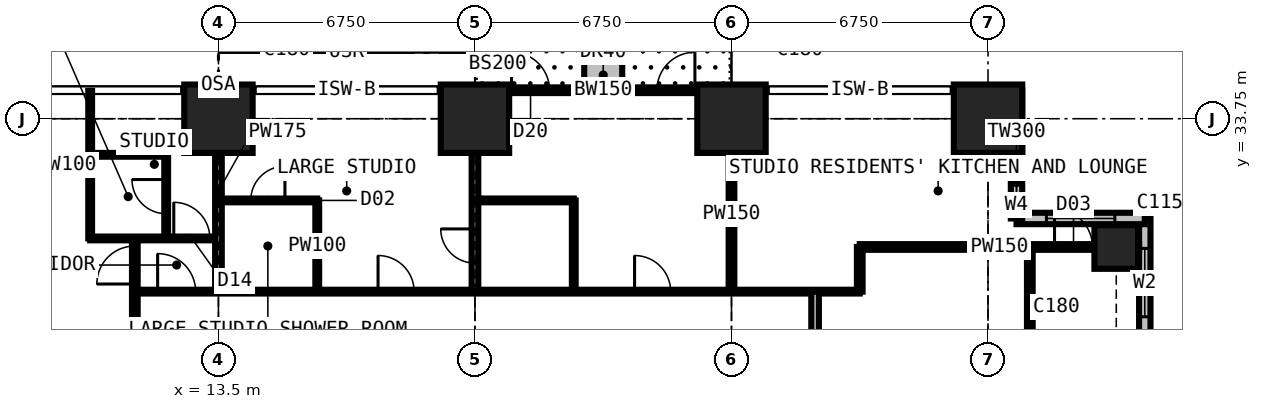
"""IFC4 building model, lengths in metres.
Left out: names, types, materials, properties, quantities, classifications, styles, units other than length and angle.
Written with IfcOpenShell. Run it as: python <this file> out.ifc"""

import sys

from ifc_helpers import new_model, si_unit, direction, frame, frame_2d, origin, origin_2d, place, context, subcontext, project, spatial, rectangle, extrude, element, fill, save


model = new_model("IFC4")
c1 = context("Model", 3, precision=1e-05, world=origin(), true_north=direction((0.0, 1.0)))
c2 = subcontext(c1, "Body", "Model", "MODEL_VIEW")
j1 = project(units=[si_unit("LENGTHUNIT", "METRE"), si_unit("PLANEANGLEUNIT", "RADIAN")], contexts=[c1])
p1 = place(None, origin())
s1 = spatial("IfcSite", under=j1, at=p1, CompositionType="ELEMENT")
p2 = place(p1, origin())
s2 = spatial("IfcBuilding", under=s1, at=p2, CompositionType="ELEMENT")
p3 = place(p2, frame((0.0, 0.0, 98.1)))
s3 = spatial("IfcBuildingStorey", under=s2, at=p3, CompositionType="ELEMENT", Elevation=98.1)
for number, where, z_axis, x_axis in (
    (1, (13.5, 33.75, 0.0), (0.0, 0.0, 1.0), (1.0, 0.0, 0.0)),
    (2, (20.25, 33.75, 0.0), (0.0, 0.0, 1.0), (1.0, 0.0, 0.0)),
    (3, (27.0, 33.75, 0.0), (0.0, 0.0, 1.0), (1.0, 0.0, 0.0)),
    (4, (33.75, 33.75, 0.0), (0.0, 0.0, 1.0), (1.0, 0.0, 0.0)),
):
    element("IfcColumn", number, at=place(p3, frame(where, z_axis=z_axis, x_axis=x_axis)), inside=s3, PredefinedType="COLUMN", context=c2, shape_type="SweptSolid", body=[
        extrude(rectangle(XDim=1.8, YDim=1.8, at=origin_2d()), origin(), (0.0, 0.0, 1.0), 3.6),
    ])
p4 = place(p3, frame((37.125, 30.375, 0.0), z_axis=(0.0, 0.0, 1.0), x_axis=(1.0, 0.0, 0.0)))
e5 = element("IfcColumn", 5, at=p4, inside=s3, PredefinedType="COLUMN", context=c2, shape_type="SweptSolid", body=[
    extrude(rectangle(XDim=1.15, YDim=1.15, at=origin_2d()), origin(), (0.0, 0.0, 1.0), 3.6),
])
p5 = place(p3, frame((37.875, 27.75, 0.0), z_axis=(0.0, 0.0, 1.0), x_axis=(0.0, 1.0, 0.0)))
e6 = element("IfcWall", 6, at=p5, inside=s3, PredefinedType="SOLIDWALL", context=c2, shape_type="SweptSolid", body=[
    extrude(rectangle(XDim=3.375, YDim=0.3, at=frame_2d((1.688, 0.0))), origin(), (0.0, 0.0, 1.0), 3.375),
])
p6 = place(p5, frame((0.788, 0.0, 0.6)))
e7 = element("IfcOpeningElement", 7, at=p6, cuts=e6, PredefinedType="OPENING", context=c2, shape_type="SweptSolid", body=[
    extrude(rectangle(XDim=1.8, YDim=2.1, at=frame_2d((0.9, 1.05))), frame((0.0, 0.16, 0.0), z_axis=(0.0, -1.0, 0.0), x_axis=(1.0, 0.0, 0.0)), (0.0, 0.0, 1.0), 0.32),
])
p7 = place(p3, frame((37.875, 31.125, 0.0), z_axis=(0.0, 0.0, 1.0), x_axis=(-1.0, 0.0, 0.0)))
e8 = element("IfcWall", 8, at=p7, inside=s3, PredefinedType="SOLIDWALL", context=c2, shape_type="SweptSolid", body=[
    extrude(rectangle(XDim=3.375, YDim=0.3, at=frame_2d((1.688, 0.0))), origin(), (0.0, 0.0, 1.0), 3.375),
])
p8 = place(p7, frame((0.788, 0.0, 0.6)))
e9 = element("IfcOpeningElement", 9, at=p8, cuts=e8, PredefinedType="OPENING", context=c2, shape_type="SweptSolid", body=[
    extrude(rectangle(XDim=1.8, YDim=2.1, at=frame_2d((0.9, 1.05))), frame((0.0, 0.16, 0.0), z_axis=(0.0, -1.0, 0.0), x_axis=(1.0, 0.0, 0.0)), (0.0, 0.0, 1.0), 0.32),
])
p9 = place(p3, frame((34.5, 31.125, 0.0), z_axis=(0.0, 0.0, 1.0), x_axis=(0.0, 1.0, 0.0)))
e10 = element("IfcWall", 10, at=p9, inside=s3, PredefinedType="SOLIDWALL", context=c2, shape_type="SweptSolid", body=[
    extrude(rectangle(XDim=3.375, YDim=0.3, at=frame_2d((1.688, 0.0))), origin(), (0.0, 0.0, 1.0), 3.375),
])
p10 = place(p9, frame((0.343, 0.0, 0.9)))
e11 = element("IfcOpeningElement", 11, at=p10, cuts=e10, PredefinedType="OPENING", context=c2, shape_type="SweptSolid", body=[
    extrude(rectangle(XDim=1.2, YDim=1.8, at=frame_2d((0.6, 0.9))), frame((0.0, 0.16, 0.0), z_axis=(0.0, -1.0, 0.0), x_axis=(1.0, 0.0, 0.0)), (0.0, 0.0, 1.0), 0.32),
])
p11 = place(p3, frame((20.25, 34.5, 0.0), z_axis=(0.0, 0.0, 1.0), x_axis=(1.0, 0.0, 0.0)))
e12 = element("IfcWall", 12, at=p11, inside=s3, PredefinedType="SOLIDWALL", context=c2, shape_type="SweptSolid", body=[
    extrude(rectangle(XDim=6.75, YDim=0.15, at=frame_2d((3.375, 0.0))), origin(), (0.0, 0.0, 1.0), 3.375),
])
p12 = place(p11, frame((0.962, 0.0, 0.0)))
e13 = element("IfcOpeningElement", 13, at=p12, cuts=e12, PredefinedType="OPENING", context=c2, shape_type="SweptSolid", body=[
    extrude(rectangle(XDim=1.0, YDim=2.2, at=frame_2d((0.5, 1.1))), frame((0.0, 0.085, 0.0), z_axis=(0.0, -1.0, 0.0), x_axis=(1.0, 0.0, 0.0)), (0.0, 0.0, 1.0), 0.17),
])
p13 = place(p11, frame((2.025, 0.0, 0.9)))
e14 = element("IfcOpeningElement", 14, at=p13, cuts=e12, PredefinedType="OPENING", context=c2, shape_type="SweptSolid", body=[
    extrude(rectangle(XDim=1.2, YDim=1.8, at=frame_2d((0.6, 0.9))), frame((0.0, 0.085, 0.0), z_axis=(0.0, -1.0, 0.0), x_axis=(1.0, 0.0, 0.0)), (0.0, 0.0, 1.0), 0.17),
])
p14 = place(p11, frame((4.788, 0.0, 0.0)))
e15 = element("IfcOpeningElement", 15, at=p14, cuts=e12, PredefinedType="OPENING", context=c2, shape_type="SweptSolid", body=[
    extrude(rectangle(XDim=1.0, YDim=2.2, at=frame_2d((0.5, 1.1))), frame((0.0, 0.085, 0.0), z_axis=(0.0, -1.0, 0.0), x_axis=(1.0, 0.0, 0.0)), (0.0, 0.0, 1.0), 0.17),
])
p15 = place(p11, frame((3.525, 0.0, 0.9)))
e16 = element("IfcOpeningElement", 16, at=p15, cuts=e12, PredefinedType="OPENING", context=c2, shape_type="SweptSolid", body=[
    extrude(rectangle(XDim=1.2, YDim=1.8, at=frame_2d((0.6, 0.9))), frame((0.0, 0.085, 0.0), z_axis=(0.0, -1.0, 0.0), x_axis=(1.0, 0.0, 0.0)), (0.0, 0.0, 1.0), 0.17),
])
p16 = place(p3, frame((23.625, 34.6, 0.0), z_axis=(0.0, 0.0, 1.0), x_axis=(0.0, 1.0, 0.0)))
e17 = element("IfcWall", 17, at=p16, inside=s3, PredefinedType="USERDEFINED", context=c2, shape_type="SweptSolid", body=[
    extrude(rectangle(XDim=2.2, YDim=1.0, at=frame_2d((1.1, 0.0))), origin(), (0.0, 0.0, 1.0), 0.9),
])
p17 = place(p3, frame((10.125, 30.6, 0.0), z_axis=(0.0, 0.0, 1.0), x_axis=(0.0, 1.0, 0.0)))
e18 = element("IfcWall", 18, at=p17, inside=s3, PredefinedType="PARTITIONING", context=c2, shape_type="SweptSolid", body=[
    extrude(rectangle(XDim=3.884, YDim=0.1, at=frame_2d((1.942, 0.0))), origin(), (0.0, 0.0, 1.0), 3.375),
])
p18 = place(p3, frame((10.125, 30.6, 0.0), z_axis=(0.0, 0.0, 1.0), x_axis=(1.0, 0.0, 0.0)))
e19 = element("IfcWall", 19, at=p18, inside=s3, PredefinedType="PARTITIONING", context=c2, shape_type="SweptSolid", body=[
    extrude(rectangle(XDim=3.375, YDim=0.1, at=frame_2d((1.688, 0.0))), origin(), (0.0, 0.0, 1.0), 3.375),
])
p19 = place(p18, frame((2.2, 0.0, 0.0)))
e20 = element("IfcOpeningElement", 20, at=p19, cuts=e19, PredefinedType="OPENING", context=c2, shape_type="SweptSolid", body=[
    extrude(rectangle(XDim=0.95, YDim=2.2, at=frame_2d((0.475, 1.1))), frame((0.0, 0.06, 0.0), z_axis=(0.0, -1.0, 0.0), x_axis=(1.0, 0.0, 0.0)), (0.0, 0.0, 1.0), 0.12),
])
p20 = place(p3, frame((10.125, 32.8, 0.0), z_axis=(0.0, 0.0, 1.0), x_axis=(1.0, 0.0, 0.0)))
e21 = element("IfcWall", 21, at=p20, inside=s3, PredefinedType="PARTITIONING", context=c2, shape_type="SweptSolid", body=[
    extrude(rectangle(XDim=2.0, YDim=0.1, at=frame_2d((1.0, 0.0))), origin(), (0.0, 0.0, 1.0), 3.375),
])
p21 = place(p3, frame((11.3, 11.3, 0.0), z_axis=(0.0, 0.0, 1.0), x_axis=(0.0, 1.0, 0.0)))
e22 = element("IfcWall", 22, at=p21, inside=s3, PredefinedType="PARTITIONING", context=c2, shape_type="SweptSolid", body=[
    extrude(rectangle(XDim=19.3, YDim=0.15, at=frame_2d((9.65, 0.0))), origin(), (0.0, 0.0, 1.0), 3.375),
])
p22 = place(p21, frame((18.1, 0.0, 0.0)))
e23 = element("IfcOpeningElement", 23, at=p22, cuts=e22, PredefinedType="OPENING", context=c2, shape_type="SweptSolid", body=[
    extrude(rectangle(XDim=1.0, YDim=2.2, at=frame_2d((0.5, 1.1))), frame((0.0, 0.085, 0.0), z_axis=(0.0, -1.0, 0.0), x_axis=(1.0, 0.0, 0.0)), (0.0, 0.0, 1.0), 0.17),
])
p23 = place(p21, frame((10.137, 0.0, 0.0)))
e24 = element("IfcOpeningElement", 24, at=p23, cuts=e22, PredefinedType="OPENING", context=c2, shape_type="SweptSolid", body=[
    extrude(rectangle(XDim=1.0, YDim=2.2, at=frame_2d((0.5, 1.1))), frame((0.0, 0.085, 0.0), z_axis=(0.0, -1.0, 0.0), x_axis=(1.0, 0.0, 0.0)), (0.0, 0.0, 1.0), 0.17),
])
p24 = place(p3, frame((11.3, 29.2, 0.0), z_axis=(0.0, 0.0, 1.0), x_axis=(1.0, 0.0, 0.0)))
e25 = element("IfcWall", 25, at=p24, inside=s3, PredefinedType="PARTITIONING", context=c2, shape_type="SweptSolid", body=[
    extrude(rectangle(XDim=19.075, YDim=0.1, at=frame_2d((9.538, 0.0))), origin(), (0.0, 0.0, 1.0), 3.375),
])
p25 = place(p24, frame((6.4, 0.0, 0.0)))
e26 = element("IfcOpeningElement", 26, at=p25, cuts=e25, PredefinedType="OPENING", context=c2, shape_type="SweptSolid", body=[
    extrude(rectangle(XDim=0.95, YDim=2.2, at=frame_2d((0.475, 1.1))), frame((0.0, 0.06, 0.0), z_axis=(0.0, -1.0, 0.0), x_axis=(1.0, 0.0, 0.0)), (0.0, 0.0, 1.0), 0.12),
])
p26 = place(p24, frame((13.15, 0.0, 0.0)))
e27 = element("IfcOpeningElement", 27, at=p26, cuts=e25, PredefinedType="OPENING", context=c2, shape_type="SweptSolid", body=[
    extrude(rectangle(XDim=0.95, YDim=2.2, at=frame_2d((0.475, 1.1))), frame((0.0, 0.06, 0.0), z_axis=(0.0, -1.0, 0.0), x_axis=(1.0, 0.0, 0.0)), (0.0, 0.0, 1.0), 0.12),
])
p27 = place(p24, frame((0.6, 0.0, 0.0)))
e28 = element("IfcOpeningElement", 28, at=p27, cuts=e25, PredefinedType="OPENING", context=c2, shape_type="SweptSolid", body=[
    extrude(rectangle(XDim=1.0, YDim=2.2, at=frame_2d((0.5, 1.1))), frame((0.0, 0.06, 0.0), z_axis=(0.0, -1.0, 0.0), x_axis=(1.0, 0.0, 0.0)), (0.0, 0.0, 1.0), 0.12),
])
p28 = place(p3, frame((12.125, 30.6, 0.0), z_axis=(0.0, 0.0, 1.0), x_axis=(0.0, 1.0, 0.0)))
e29 = element("IfcWall", 29, at=p28, inside=s3, PredefinedType="PARTITIONING", context=c2, shape_type="SweptSolid", body=[
    extrude(rectangle(XDim=2.2, YDim=0.1, at=frame_2d((1.1, 0.0))), origin(), (0.0, 0.0, 1.0), 3.375),
])
p29 = place(p28, frame((0.65, 0.0, 0.0)))
e30 = element("IfcOpeningElement", 30, at=p29, cuts=e29, PredefinedType="OPENING", context=c2, shape_type="SweptSolid", body=[
    extrude(rectangle(XDim=0.9, YDim=2.2, at=frame_2d((0.45, 1.1))), frame((0.0, 0.06, 0.0), z_axis=(0.0, -1.0, 0.0), x_axis=(1.0, 0.0, 0.0)), (0.0, 0.0, 1.0), 0.12),
])
p30 = place(p3, frame((13.5, 29.2, 0.0), z_axis=(0.0, 0.0, 1.0), x_axis=(0.0, 1.0, 0.0)))
e31 = element("IfcWall", 31, at=p30, inside=s3, PredefinedType="PARTITIONING", context=c2, shape_type="SweptSolid", body=[
    extrude(rectangle(XDim=5.284, YDim=0.175, at=frame_2d((2.642, 0.0))), origin(), (0.0, 0.0, 1.0), 2.61),
])
p31 = place(p3, frame((13.5, 31.6, 0.0), z_axis=(0.0, 0.0, 1.0), x_axis=(1.0, 0.0, 0.0)))
e32 = element("IfcWall", 32, at=p31, inside=s3, PredefinedType="PARTITIONING", context=c2, shape_type="SweptSolid", body=[
    extrude(rectangle(XDim=2.6, YDim=0.1, at=frame_2d((1.3, 0.0))), origin(), (0.0, 0.0, 1.0), 3.375),
])
p32 = place(p31, frame((0.85, 0.0, 0.0)))
e33 = element("IfcOpeningElement", 33, at=p32, cuts=e32, PredefinedType="OPENING", context=c2, shape_type="SweptSolid", body=[
    extrude(rectangle(XDim=0.9, YDim=2.2, at=frame_2d((0.45, 1.1))), frame((0.0, 0.06, 0.0), z_axis=(0.0, -1.0, 0.0), x_axis=(1.0, 0.0, 0.0)), (0.0, 0.0, 1.0), 0.12),
])
p33 = place(p3, frame((16.1, 29.2, 0.0), z_axis=(0.0, 0.0, 1.0), x_axis=(0.0, 1.0, 0.0)))
e34 = element("IfcWall", 34, at=p33, inside=s3, PredefinedType="PARTITIONING", context=c2, shape_type="SweptSolid", body=[
    extrude(rectangle(XDim=2.4, YDim=0.1, at=frame_2d((1.2, 0.0))), origin(), (0.0, 0.0, 1.0), 3.375),
])
p34 = place(p3, frame((20.25, 29.2, 0.0), z_axis=(0.0, 0.0, 1.0), x_axis=(0.0, 1.0, 0.0)))
e35 = element("IfcWall", 35, at=p34, inside=s3, PredefinedType="PARTITIONING", context=c2, shape_type="SweptSolid", body=[
    extrude(rectangle(XDim=5.284, YDim=0.175, at=frame_2d((2.642, 0.0))), origin(), (0.0, 0.0, 1.0), 2.61),
])
p35 = place(p34, frame((0.75, 0.0, 0.0)))
e36 = element("IfcOpeningElement", 36, at=p35, cuts=e35, PredefinedType="OPENING", context=c2, shape_type="SweptSolid", body=[
    extrude(rectangle(XDim=0.9, YDim=2.2, at=frame_2d((0.45, 1.1))), frame((0.0, 0.097, 0.0), z_axis=(0.0, -1.0, 0.0), x_axis=(1.0, 0.0, 0.0)), (0.0, 0.0, 1.0), 0.195),
])
p36 = place(p3, frame((20.25, 31.6, 0.0), z_axis=(0.0, 0.0, 1.0), x_axis=(1.0, 0.0, 0.0)))
e37 = element("IfcWall", 37, at=p36, inside=s3, PredefinedType="PARTITIONING", context=c2, shape_type="SweptSolid", body=[
    extrude(rectangle(XDim=2.6, YDim=0.1, at=frame_2d((1.3, 0.0))), origin(), (0.0, 0.0, 1.0), 3.375),
])
p37 = place(p3, frame((22.85, 29.2, 0.0), z_axis=(0.0, 0.0, 1.0), x_axis=(0.0, 1.0, 0.0)))
e38 = element("IfcWall", 38, at=p37, inside=s3, PredefinedType="PARTITIONING", context=c2, shape_type="SweptSolid", body=[
    extrude(rectangle(XDim=2.4, YDim=0.1, at=frame_2d((1.2, 0.0))), origin(), (0.0, 0.0, 1.0), 3.375),
])
p38 = place(p3, frame((27.0, 29.2, 0.0), z_axis=(0.0, 0.0, 1.0), x_axis=(0.0, 1.0, 0.0)))
e39 = element("IfcWall", 39, at=p38, inside=s3, PredefinedType="PARTITIONING", context=c2, shape_type="SweptSolid", body=[
    extrude(rectangle(XDim=5.284, YDim=0.15, at=frame_2d((2.642, 0.0))), origin(), (0.0, 0.0, 1.0), 2.806),
])
p39 = place(p3, frame((29.2, 11.3, 0.0), z_axis=(0.0, 0.0, 1.0), x_axis=(0.0, 1.0, 0.0)))
e40 = element("IfcWall", 40, at=p39, inside=s3, PredefinedType="PARTITIONING", context=c2, shape_type="SweptSolid", body=[
    extrude(rectangle(XDim=17.9, YDim=0.2, at=frame_2d((8.95, 0.0))), origin(), (0.0, 0.0, 1.0), 3.375),
])
p40 = place(p39, frame((8.35, 0.0, 0.0)))
e41 = element("IfcOpeningElement", 41, at=p40, cuts=e40, PredefinedType="OPENING", context=c2, shape_type="SweptSolid", body=[
    extrude(rectangle(XDim=1.2, YDim=2.2, at=frame_2d((0.6, 1.1))), frame((0.0, 0.11, 0.0), z_axis=(0.0, -1.0, 0.0), x_axis=(1.0, 0.0, 0.0)), (0.0, 0.0, 1.0), 0.22),
])
p41 = place(p3, frame((30.375, 29.2, 0.0), z_axis=(0.0, 0.0, 1.0), x_axis=(0.0, 1.0, 0.0)))
e42 = element("IfcWall", 42, at=p41, inside=s3, PredefinedType="PARTITIONING", context=c2, shape_type="SweptSolid", body=[
    extrude(rectangle(XDim=1.175, YDim=0.15, at=frame_2d((0.587, 0.0))), origin(), (0.0, 0.0, 1.0), 3.375),
])
p42 = place(p3, frame((30.375, 30.375, 0.0), z_axis=(0.0, 0.0, 1.0), x_axis=(1.0, 0.0, 0.0)))
e43 = element("IfcWall", 43, at=p42, inside=s3, PredefinedType="PARTITIONING", context=c2, shape_type="SweptSolid", body=[
    extrude(rectangle(XDim=7.35, YDim=0.15, at=frame_2d((3.675, 0.0))), origin(), (0.0, 0.0, 1.0), 2.877),
])
p43 = place(p42, frame((5.125, 0.0, 0.0)))
e44 = element("IfcOpeningElement", 44, at=p43, cuts=e43, PredefinedType="OPENING", context=c2, shape_type="SweptSolid", body=[
    extrude(rectangle(XDim=1.0, YDim=2.2, at=frame_2d((0.5, 1.1))), frame((0.0, 0.085, 0.0), z_axis=(0.0, -1.0, 0.0), x_axis=(1.0, 0.0, 0.0)), (0.0, 0.0, 1.0), 0.17),
])
p44 = place(p3, frame((34.85, 12.55, 0.0), z_axis=(0.0, 0.0, 1.0), x_axis=(0.0, 1.0, 0.0)))
e45 = element("IfcWall", 45, at=p44, inside=s3, PredefinedType="PARTITIONING", context=c2, shape_type="SweptSolid", body=[
    extrude(rectangle(XDim=17.825, YDim=0.15, at=frame_2d((8.913, 0.0))), origin(), (0.0, 0.0, 1.0), 3.375),
])
p45 = place(p44, frame((8.6, 0.0, 0.0)))
e46 = element("IfcOpeningElement", 46, at=p45, cuts=e45, PredefinedType="OPENING", context=c2, shape_type="SweptSolid", body=[
    extrude(rectangle(XDim=0.95, YDim=2.2, at=frame_2d((0.475, 1.1))), frame((0.0, 0.085, 0.0), z_axis=(0.0, -1.0, 0.0), x_axis=(1.0, 0.0, 0.0)), (0.0, 0.0, 1.0), 0.17),
])
p46 = place(p6, origin())
e47 = element("IfcWindow", 47, at=p46, inside=s3, PartitioningType="SINGLE_PANEL", PredefinedType="WINDOW", context=c2, shape_type="SweptSolid", body=[
    extrude(rectangle(XDim=1.8, YDim=2.1, at=frame_2d((0.9, 1.05))), frame((0.0, 0.03, 0.0), z_axis=(0.0, -1.0, 0.0), x_axis=(1.0, 0.0, 0.0)), (0.0, 0.0, 1.0), 0.06),
])
fill(e7, e47)
p47 = place(p8, origin())
e48 = element("IfcWindow", 48, at=p47, inside=s3, PartitioningType="SINGLE_PANEL", PredefinedType="WINDOW", context=c2, shape_type="SweptSolid", body=[
    extrude(rectangle(XDim=1.8, YDim=2.1, at=frame_2d((0.9, 1.05))), frame((0.0, 0.03, 0.0), z_axis=(0.0, -1.0, 0.0), x_axis=(1.0, 0.0, 0.0)), (0.0, 0.0, 1.0), 0.06),
])
fill(e9, e48)
p48 = place(p10, origin())
e49 = element("IfcWindow", 49, at=p48, inside=s3, PartitioningType="SINGLE_PANEL", PredefinedType="WINDOW", context=c2, shape_type="SweptSolid", body=[
    extrude(rectangle(XDim=1.2, YDim=1.8, at=frame_2d((0.6, 0.9))), frame((0.0, 0.03, 0.0), z_axis=(0.0, -1.0, 0.0), x_axis=(1.0, 0.0, 0.0)), (0.0, 0.0, 1.0), 0.06),
])
fill(e11, e49)
p49 = place(p12, origin())
e50 = element("IfcDoor", 50, at=p49, inside=s3, OperationType="SINGLE_SWING_LEFT", PredefinedType="DOOR", context=c2, shape_type="SweptSolid", body=[
    extrude(rectangle(XDim=1.0, YDim=2.2, at=frame_2d((0.5, 1.1))), frame((0.0, 0.025, 0.0), z_axis=(0.0, -1.0, 0.0), x_axis=(1.0, 0.0, 0.0)), (0.0, 0.0, 1.0), 0.05),
])
fill(e13, e50)
p50 = place(p13, origin())
e51 = element("IfcWindow", 51, at=p50, inside=s3, PartitioningType="SINGLE_PANEL", PredefinedType="WINDOW", context=c2, shape_type="SweptSolid", body=[
    extrude(rectangle(XDim=1.2, YDim=1.8, at=frame_2d((0.6, 0.9))), frame((0.0, 0.03, 0.0), z_axis=(0.0, -1.0, 0.0), x_axis=(1.0, 0.0, 0.0)), (0.0, 0.0, 1.0), 0.06),
])
fill(e14, e51)
p51 = place(p14, origin())
e52 = element("IfcDoor", 52, at=p51, inside=s3, OperationType="SINGLE_SWING_RIGHT", PredefinedType="DOOR", context=c2, shape_type="SweptSolid", body=[
    extrude(rectangle(XDim=1.0, YDim=2.2, at=frame_2d((0.5, 1.1))), frame((0.0, 0.025, 0.0), z_axis=(0.0, -1.0, 0.0), x_axis=(1.0, 0.0, 0.0)), (0.0, 0.0, 1.0), 0.05),
])
fill(e15, e52)
p52 = place(p15, origin())
e53 = element("IfcWindow", 53, at=p52, inside=s3, PartitioningType="SINGLE_PANEL", PredefinedType="WINDOW", context=c2, shape_type="SweptSolid", body=[
    extrude(rectangle(XDim=1.2, YDim=1.8, at=frame_2d((0.6, 0.9))), frame((0.0, 0.03, 0.0), z_axis=(0.0, -1.0, 0.0), x_axis=(1.0, 0.0, 0.0)), (0.0, 0.0, 1.0), 0.06),
])
fill(e16, e53)
p53 = place(p43, origin())
e54 = element("IfcDoor", 54, at=p53, inside=s3, OperationType="SINGLE_SWING_LEFT", PredefinedType="DOOR", context=c2, shape_type="SweptSolid", body=[
    extrude(rectangle(XDim=1.0, YDim=2.2, at=frame_2d((0.5, 1.1))), frame((0.0, 0.025, 0.0), z_axis=(0.0, -1.0, 0.0), x_axis=(1.0, 0.0, 0.0)), (0.0, 0.0, 1.0), 0.05),
])
fill(e44, e54)
p54 = place(p25, origin())
e55 = element("IfcDoor", 55, at=p54, inside=s3, OperationType="SINGLE_SWING_LEFT", PredefinedType="DOOR", context=c2, shape_type="SweptSolid", body=[
    extrude(rectangle(XDim=0.95, YDim=2.2, at=frame_2d((0.475, 1.1))), frame((0.0, 0.025, 0.0), z_axis=(0.0, -1.0, 0.0), x_axis=(1.0, 0.0, 0.0)), (0.0, 0.0, 1.0), 0.05),
])
fill(e26, e55)
p55 = place(p32, origin())
e56 = element("IfcDoor", 56, at=p55, inside=s3, OperationType="SINGLE_SWING_RIGHT", PredefinedType="DOOR", context=c2, shape_type="SweptSolid", body=[
    extrude(rectangle(XDim=0.9, YDim=2.2, at=frame_2d((0.45, 1.1))), frame((0.0, 0.025, 0.0), z_axis=(0.0, -1.0, 0.0), x_axis=(1.0, 0.0, 0.0)), (0.0, 0.0, 1.0), 0.05),
])
fill(e33, e56)
p56 = place(p26, origin())
e57 = element("IfcDoor", 57, at=p56, inside=s3, OperationType="SINGLE_SWING_LEFT", PredefinedType="DOOR", context=c2, shape_type="SweptSolid", body=[
    extrude(rectangle(XDim=0.95, YDim=2.2, at=frame_2d((0.475, 1.1))), frame((0.0, 0.025, 0.0), z_axis=(0.0, -1.0, 0.0), x_axis=(1.0, 0.0, 0.0)), (0.0, 0.0, 1.0), 0.05),
])
fill(e27, e57)
p57 = place(p35, origin())
e58 = element("IfcDoor", 58, at=p57, inside=s3, OperationType="SINGLE_SWING_RIGHT", PredefinedType="DOOR", context=c2, shape_type="SweptSolid", body=[
    extrude(rectangle(XDim=0.9, YDim=2.2, at=frame_2d((0.45, 1.1))), frame((0.0, 0.025, 0.0), z_axis=(0.0, -1.0, 0.0), x_axis=(1.0, 0.0, 0.0)), (0.0, 0.0, 1.0), 0.05),
])
fill(e36, e58)
p58 = place(p19, origin())
e59 = element("IfcDoor", 59, at=p58, inside=s3, OperationType="SINGLE_SWING_LEFT", PredefinedType="DOOR", context=c2, shape_type="SweptSolid", body=[
    extrude(rectangle(XDim=0.95, YDim=2.2, at=frame_2d((0.475, 1.1))), frame((0.0, 0.025, 0.0), z_axis=(0.0, -1.0, 0.0), x_axis=(1.0, 0.0, 0.0)), (0.0, 0.0, 1.0), 0.05),
])
fill(e20, e59)
p59 = place(p29, origin())
e60 = element("IfcDoor", 60, at=p59, inside=s3, OperationType="SINGLE_SWING_RIGHT", PredefinedType="DOOR", context=c2, shape_type="SweptSolid", body=[
    extrude(rectangle(XDim=0.9, YDim=2.2, at=frame_2d((0.45, 1.1))), frame((0.0, 0.025, 0.0), z_axis=(0.0, -1.0, 0.0), x_axis=(1.0, 0.0, 0.0)), (0.0, 0.0, 1.0), 0.05),
])
fill(e30, e60)
p60 = place(p27, origin())
e61 = element("IfcDoor", 61, at=p60, inside=s3, OperationType="SINGLE_SWING_LEFT", PredefinedType="DOOR", context=c2, shape_type="SweptSolid", body=[
    extrude(rectangle(XDim=1.0, YDim=2.2, at=frame_2d((0.5, 1.1))), frame((0.0, 0.025, 0.0), z_axis=(0.0, -1.0, 0.0), x_axis=(1.0, 0.0, 0.0)), (0.0, 0.0, 1.0), 0.05),
])
fill(e28, e61)
p61 = place(p22, origin())
e62 = element("IfcDoor", 62, at=p61, inside=s3, OperationType="SINGLE_SWING_LEFT", PredefinedType="DOOR", context=c2, shape_type="SweptSolid", body=[
    extrude(rectangle(XDim=1.0, YDim=2.2, at=frame_2d((0.5, 1.1))), frame((0.0, 0.025, 0.0), z_axis=(0.0, -1.0, 0.0), x_axis=(1.0, 0.0, 0.0)), (0.0, 0.0, 1.0), 0.05),
])
fill(e23, e62)
save(model, sys.argv[1])
